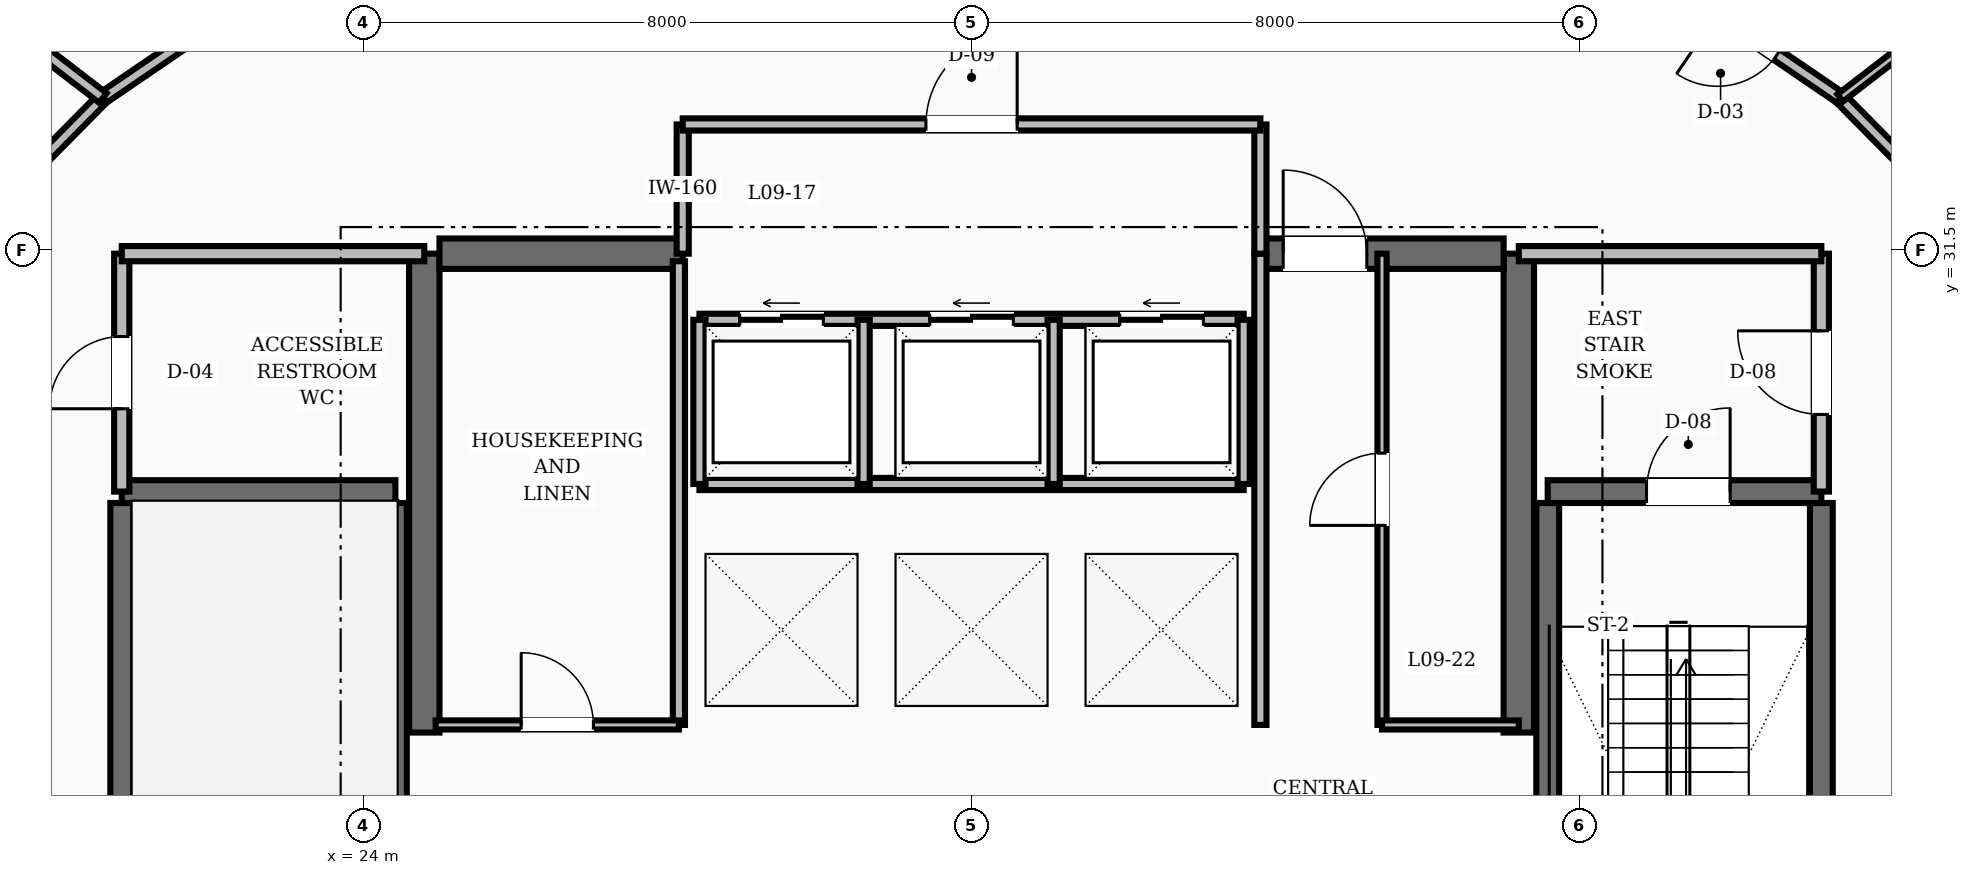
"""IFC4 building model, lengths in metres.
Left out: names, types, materials, properties, quantities, classifications, styles, units other than length and angle.
Written with IfcOpenShell. Run it as: python <this file> out.ifc"""

import sys

from ifc_helpers import new_model, si_unit, direction, frame, frame_2d, origin, place, context, subcontext, project, spatial, rectangle, extrude, element, fill, save


model = new_model("IFC4")
c1 = context("Model", 3, precision=1e-05, world=origin(), true_north=direction((0.0, 1.0)))
c2 = subcontext(c1, "Body", "Model", "MODEL_VIEW")
j1 = project(units=[si_unit("LENGTHUNIT", "METRE"), si_unit("PLANEANGLEUNIT", "RADIAN")], contexts=[c1])
p1 = place(None, origin())
s1 = spatial("IfcSite", under=j1, at=p1, CompositionType="ELEMENT")
p2 = place(p1, origin())
s2 = spatial("IfcBuilding", under=s1, at=p2, CompositionType="ELEMENT")
p3 = place(p2, frame((0.0, 0.0, 41.2)))
s3 = spatial("IfcBuildingStorey", under=s2, at=p3, CompositionType="ELEMENT", Elevation=41.2)
for number, where, z_axis, x_axis in (
    (1, (24.8, 25.15, 0.0), (0.0, 0.0, 1.0), (0.0, 1.0, 0.0)),
    (2, (39.2, 25.15, 0.0), (0.0, 0.0, 1.0), (0.0, 1.0, 0.0)),
):
    element("IfcWall", number, at=place(p3, frame(where, z_axis=z_axis, x_axis=x_axis)), inside=s3, PredefinedType="SHEAR", context=c2, shape_type="SweptSolid", body=[
        extrude(rectangle(XDim=6.3, YDim=0.4, at=frame_2d((3.15, 0.0))), origin(), (0.0, 0.0, 1.0), 3.6),
    ])
p4 = place(p3, frame((25.0, 31.45, 0.0), z_axis=(0.0, 0.0, 1.0), x_axis=(1.0, 0.0, 0.0)))
e3 = element("IfcWall", 3, at=p4, inside=s3, PredefinedType="SHEAR", context=c2, shape_type="SweptSolid", body=[
    extrude(rectangle(XDim=3.2, YDim=0.4, at=frame_2d((1.6, 0.0))), origin(), (0.0, 0.0, 1.0), 3.6),
])
p5 = place(p3, frame((35.8, 31.45, 0.0), z_axis=(0.0, 0.0, 1.0), x_axis=(1.0, 0.0, 0.0)))
e4 = element("IfcWall", 4, at=p5, inside=s3, PredefinedType="SHEAR", context=c2, shape_type="SweptSolid", body=[
    extrude(rectangle(XDim=3.2, YDim=0.4, at=frame_2d((1.6, 0.0))), origin(), (0.0, 0.0, 1.0), 3.6),
])
p6 = place(p5, frame((0.3, 0.0, 0.0)))
e5 = element("IfcOpeningElement", 5, at=p6, cuts=e4, PredefinedType="OPENING", context=c2, shape_type="SweptSolid", body=[
    extrude(rectangle(XDim=1.1, YDim=2.1, at=frame_2d((0.55, 1.05))), frame((0.0, 0.21, 0.0), z_axis=(0.0, -1.0, 0.0), x_axis=(1.0, 0.0, 0.0)), (0.0, 0.0, 1.0), 0.42),
])
for number, where, z_axis, x_axis in (
    (6, (20.82, 19.43, 0.0), (0.0, 0.0, 1.0), (0.0, 1.0, 0.0)),
    (7, (24.42, 19.43, 0.0), (0.0, 0.0, 1.0), (0.0, 1.0, 0.0)),
):
    element("IfcWall", number, at=place(p3, frame(where, z_axis=z_axis, x_axis=x_axis)), inside=s3, PredefinedType="SHEAR", context=c2, shape_type="SweptSolid", body=[
        extrude(rectangle(XDim=8.74, YDim=0.3, at=frame_2d((4.37, 0.0))), origin(), (0.0, 0.0, 1.0), 3.6),
    ])
p7 = place(p3, frame((20.82, 28.32, 0.0), z_axis=(0.0, 0.0, 1.0), x_axis=(1.0, 0.0, 0.0)))
e8 = element("IfcWall", 8, at=p7, inside=s3, PredefinedType="SHEAR", context=c2, shape_type="SweptSolid", body=[
    extrude(rectangle(XDim=3.6, YDim=0.3, at=frame_2d((1.8, 0.0))), origin(), (0.0, 0.0, 1.0), 3.6),
])
for number, where, z_axis, x_axis in (
    (9, (43.18, 19.43, 0.0), (0.0, 0.0, 1.0), (0.0, 1.0, 0.0)),
    (10, (39.58, 19.43, 0.0), (0.0, 0.0, 1.0), (0.0, 1.0, 0.0)),
):
    element("IfcWall", number, at=place(p3, frame(where, z_axis=z_axis, x_axis=x_axis)), inside=s3, PredefinedType="SHEAR", context=c2, shape_type="SweptSolid", body=[
        extrude(rectangle(XDim=8.74, YDim=0.3, at=frame_2d((4.37, 0.0))), origin(), (0.0, 0.0, 1.0), 3.6),
    ])
p8 = place(p3, frame((39.58, 28.32, 0.0), z_axis=(0.0, 0.0, 1.0), x_axis=(1.0, 0.0, 0.0)))
e11 = element("IfcWall", 11, at=p8, inside=s3, PredefinedType="SHEAR", context=c2, shape_type="SweptSolid", body=[
    extrude(rectangle(XDim=3.6, YDim=0.3, at=frame_2d((1.8, 0.0))), origin(), (0.0, 0.0, 1.0), 3.6),
])
p9 = place(p8, frame((1.3, 0.0, 0.0)))
e12 = element("IfcOpeningElement", 12, at=p9, cuts=e11, PredefinedType="OPENING", context=c2, shape_type="SweptSolid", body=[
    extrude(rectangle(XDim=1.1, YDim=2.1, at=frame_2d((0.55, 1.05))), frame((0.0, 0.16, 0.0), z_axis=(0.0, -1.0, 0.0), x_axis=(1.0, 0.0, 0.0)), (0.0, 0.0, 1.0), 0.32),
])
p10 = place(p3, frame((43.18, 28.32, 0.0), z_axis=(0.0, 0.0, 1.0), x_axis=(0.0, 1.0, 0.0)))
e13 = element("IfcWall", 13, at=p10, inside=s3, PredefinedType="SOLIDWALL", context=c2, shape_type="SweptSolid", body=[
    extrude(rectangle(XDim=3.13, YDim=0.2, at=frame_2d((1.565, 0.0))), origin(), (0.0, 0.0, 1.0), 2.61),
])
p11 = place(p10, frame((1.015, 0.0, 0.0)))
e14 = element("IfcOpeningElement", 14, at=p11, cuts=e13, PredefinedType="OPENING", context=c2, shape_type="SweptSolid", body=[
    extrude(rectangle(XDim=1.1, YDim=2.1, at=frame_2d((0.55, 1.05))), frame((0.0, 0.11, 0.0), z_axis=(0.0, -1.0, 0.0), x_axis=(1.0, 0.0, 0.0)), (0.0, 0.0, 1.0), 0.22),
])
p12 = place(p3, frame((39.2, 31.45, 0.0), z_axis=(0.0, 0.0, 1.0), x_axis=(1.0, 0.0, 0.0)))
e15 = element("IfcWall", 15, at=p12, inside=s3, PredefinedType="SOLIDWALL", context=c2, shape_type="SweptSolid", body=[
    extrude(rectangle(XDim=3.98, YDim=0.2, at=frame_2d((1.99, 0.0))), origin(), (0.0, 0.0, 1.0), 2.61),
])
p13 = place(p3, frame((20.82, 28.32, 0.0), z_axis=(0.0, 0.0, 1.0), x_axis=(0.0, 1.0, 0.0)))
e16 = element("IfcWall", 16, at=p13, inside=s3, PredefinedType="SOLIDWALL", context=c2, shape_type="SweptSolid", body=[
    extrude(rectangle(XDim=3.13, YDim=0.2, at=frame_2d((1.565, 0.0))), origin(), (0.0, 0.0, 1.0), 2.61),
])
p14 = place(p13, frame((1.09, 0.0, 0.0)))
e17 = element("IfcOpeningElement", 17, at=p14, cuts=e16, PredefinedType="OPENING", context=c2, shape_type="SweptSolid", body=[
    extrude(rectangle(XDim=0.95, YDim=2.1, at=frame_2d((0.475, 1.05))), frame((0.0, 0.11, 0.0), z_axis=(0.0, -1.0, 0.0), x_axis=(1.0, 0.0, 0.0)), (0.0, 0.0, 1.0), 0.22),
])
p15 = place(p3, frame((20.82, 31.45, 0.0), z_axis=(0.0, 0.0, 1.0), x_axis=(1.0, 0.0, 0.0)))
e18 = element("IfcWall", 18, at=p15, inside=s3, PredefinedType="SOLIDWALL", context=c2, shape_type="SweptSolid", body=[
    extrude(rectangle(XDim=3.98, YDim=0.2, at=frame_2d((1.99, 0.0))), origin(), (0.0, 0.0, 1.0), 2.61),
])
p16 = place(p3, frame((35.8, 25.25, 0.0), z_axis=(0.0, 0.0, 1.0), x_axis=(0.0, 1.0, 0.0)))
e19 = element("IfcWall", 19, at=p16, inside=s3, PredefinedType="SOLIDWALL", context=c2, shape_type="SweptSolid", body=[
    extrude(rectangle(XDim=6.2, YDim=0.16, at=frame_2d((3.1, 0.0))), origin(), (0.0, 0.0, 1.0), 2.61),
])
p17 = place(p3, frame((28.42, 30.58, 0.0), z_axis=(0.0, 0.0, 1.0), x_axis=(1.0, 0.0, 0.0)))
e20 = element("IfcWall", 20, at=p17, inside=s3, PredefinedType="SOLIDWALL", context=c2, shape_type="SweptSolid", body=[
    extrude(rectangle(XDim=7.16, YDim=0.16, at=frame_2d((3.58, 0.0))), origin(), (0.0, 0.0, 1.0), 2.61),
])
p18 = place(p17, frame((0.53, 0.0, 0.0)))
e21 = element("IfcOpeningElement", 21, at=p18, cuts=e20, PredefinedType="OPENING", context=c2, shape_type="SweptSolid", body=[
    extrude(rectangle(XDim=1.1, YDim=2.15, at=frame_2d((0.55, 1.075))), frame((0.0, 0.09, 0.0), z_axis=(0.0, -1.0, 0.0), x_axis=(1.0, 0.0, 0.0)), (0.0, 0.0, 1.0), 0.18),
])
p19 = place(p17, frame((3.03, 0.0, 0.0)))
e22 = element("IfcOpeningElement", 22, at=p19, cuts=e20, PredefinedType="OPENING", context=c2, shape_type="SweptSolid", body=[
    extrude(rectangle(XDim=1.1, YDim=2.15, at=frame_2d((0.55, 1.075))), frame((0.0, 0.09, 0.0), z_axis=(0.0, -1.0, 0.0), x_axis=(1.0, 0.0, 0.0)), (0.0, 0.0, 1.0), 0.18),
])
p20 = place(p17, frame((5.53, 0.0, 0.0)))
e23 = element("IfcOpeningElement", 23, at=p20, cuts=e20, PredefinedType="OPENING", context=c2, shape_type="SweptSolid", body=[
    extrude(rectangle(XDim=1.1, YDim=2.15, at=frame_2d((0.55, 1.075))), frame((0.0, 0.09, 0.0), z_axis=(0.0, -1.0, 0.0), x_axis=(1.0, 0.0, 0.0)), (0.0, 0.0, 1.0), 0.18),
])
p21 = place(p3, frame((28.42, 28.42, 0.0), z_axis=(0.0, 0.0, 1.0), x_axis=(1.0, 0.0, 0.0)))
e24 = element("IfcWall", 24, at=p21, inside=s3, PredefinedType="SOLIDWALL", context=c2, shape_type="SweptSolid", body=[
    extrude(rectangle(XDim=7.16, YDim=0.16, at=frame_2d((3.58, 0.0))), origin(), (0.0, 0.0, 1.0), 2.61),
])
for number, where, z_axis, x_axis in (
    (25, (28.42, 28.42, 0.0), (0.0, 0.0, 1.0), (0.0, 1.0, 0.0)),
    (26, (30.58, 28.42, 0.0), (0.0, 0.0, 1.0), (0.0, 1.0, 0.0)),
    (27, (33.08, 28.42, 0.0), (0.0, 0.0, 1.0), (0.0, 1.0, 0.0)),
    (28, (35.58, 28.42, 0.0), (0.0, 0.0, 1.0), (0.0, 1.0, 0.0)),
):
    element("IfcWall", number, at=place(p3, frame(where, z_axis=z_axis, x_axis=x_axis)), inside=s3, PredefinedType="SOLIDWALL", context=c2, shape_type="SweptSolid", body=[
        extrude(rectangle(XDim=2.16, YDim=0.16, at=frame_2d((1.08, 0.0))), origin(), (0.0, 0.0, 1.0), 2.61),
    ])
for number, where, z_axis, x_axis in (
    (29, (28.2, 31.45, 0.0), (0.0, 0.0, 1.0), (0.0, 1.0, 0.0)),
    (30, (35.8, 31.45, 0.0), (0.0, 0.0, 1.0), (0.0, 1.0, 0.0)),
):
    element("IfcWall", number, at=place(p3, frame(where, z_axis=z_axis, x_axis=x_axis)), inside=s3, PredefinedType="SOLIDWALL", context=c2, shape_type="SweptSolid", body=[
        extrude(rectangle(XDim=1.7, YDim=0.16, at=frame_2d((0.85, 0.0))), origin(), (0.0, 0.0, 1.0), 2.61),
    ])
p22 = place(p3, frame((28.2, 33.15, 0.0), z_axis=(0.0, 0.0, 1.0), x_axis=(1.0, 0.0, 0.0)))
e31 = element("IfcWall", 31, at=p22, inside=s3, PredefinedType="SOLIDWALL", context=c2, shape_type="SweptSolid", body=[
    extrude(rectangle(XDim=7.6, YDim=0.16, at=frame_2d((3.8, 0.0))), origin(), (0.0, 0.0, 1.0), 2.61),
])
p23 = place(p22, frame((3.2, 0.0, 0.0)))
e32 = element("IfcOpeningElement", 32, at=p23, cuts=e31, PredefinedType="OPENING", context=c2, shape_type="SweptSolid", body=[
    extrude(rectangle(XDim=1.2, YDim=2.1, at=frame_2d((0.6, 1.05))), frame((0.0, 0.09, 0.0), z_axis=(0.0, -1.0, 0.0), x_axis=(1.0, 0.0, 0.0)), (0.0, 0.0, 1.0), 0.18),
])
p24 = place(p3, frame((28.15, 25.25, 0.0), z_axis=(0.0, 0.0, 1.0), x_axis=(0.0, 1.0, 0.0)))
e33 = element("IfcWall", 33, at=p24, inside=s3, PredefinedType="SOLIDWALL", context=c2, shape_type="SweptSolid", body=[
    extrude(rectangle(XDim=6.1, YDim=0.16, at=frame_2d((3.05, 0.0))), origin(), (0.0, 0.0, 1.0), 2.61),
])
p25 = place(p3, frame((24.95, 25.25, 0.0), z_axis=(0.0, 0.0, 1.0), x_axis=(1.0, 0.0, 0.0)))
e34 = element("IfcWall", 34, at=p25, inside=s3, PredefinedType="PARTITIONING", context=c2, shape_type="SweptSolid", body=[
    extrude(rectangle(XDim=3.2, YDim=0.12, at=frame_2d((1.6, 0.0))), origin(), (0.0, 0.0, 1.0), 2.61),
])
p26 = place(p25, frame((1.125, 0.0, 0.0)))
e35 = element("IfcOpeningElement", 35, at=p26, cuts=e34, PredefinedType="OPENING", context=c2, shape_type="SweptSolid", body=[
    extrude(rectangle(XDim=0.95, YDim=2.1, at=frame_2d((0.475, 1.05))), frame((0.0, 0.07, 0.0), z_axis=(0.0, -1.0, 0.0), x_axis=(1.0, 0.0, 0.0)), (0.0, 0.0, 1.0), 0.14),
])
p27 = place(p3, frame((37.4, 25.25, 0.0), z_axis=(0.0, 0.0, 1.0), x_axis=(0.0, 1.0, 0.0)))
e36 = element("IfcWall", 36, at=p27, inside=s3, PredefinedType="PARTITIONING", context=c2, shape_type="SweptSolid", body=[
    extrude(rectangle(XDim=6.2, YDim=0.12, at=frame_2d((3.1, 0.0))), origin(), (0.0, 0.0, 1.0), 2.61),
])
p28 = place(p27, frame((2.625, 0.0, 0.0)))
e37 = element("IfcOpeningElement", 37, at=p28, cuts=e36, PredefinedType="OPENING", context=c2, shape_type="SweptSolid", body=[
    extrude(rectangle(XDim=0.95, YDim=2.1, at=frame_2d((0.475, 1.05))), frame((0.0, 0.07, 0.0), z_axis=(0.0, -1.0, 0.0), x_axis=(1.0, 0.0, 0.0)), (0.0, 0.0, 1.0), 0.14),
])
p29 = place(p3, frame((37.4, 25.25, 0.0), z_axis=(0.0, 0.0, 1.0), x_axis=(1.0, 0.0, 0.0)))
e38 = element("IfcWall", 38, at=p29, inside=s3, PredefinedType="PARTITIONING", context=c2, shape_type="SweptSolid", body=[
    extrude(rectangle(XDim=1.8, YDim=0.12, at=frame_2d((0.9, 0.0))), origin(), (0.0, 0.0, 1.0), 2.61),
])
p30 = place(p3, frame((45.438, 31.463, 0.0), z_axis=(0.0, 0.0, 1.0), x_axis=(-0.702569520063, 0.711615113301, 0.0)))
e39 = element("IfcWall", 39, at=p30, inside=s3, PredefinedType="SOLIDWALL", context=c2, shape_type="SweptSolid", body=[
    extrude(rectangle(XDim=2.861, YDim=0.16, at=frame_2d((1.43, 0.0))), origin(), (0.0, 0.0, 1.0), 2.61),
])
p31 = place(p3, frame((43.428, 33.499, 0.0), z_axis=(0.0, 0.0, 1.0), x_axis=(-0.826112340767, 0.563505457323, 0.0)))
e40 = element("IfcWall", 40, at=p31, inside=s3, PredefinedType="SOLIDWALL", context=c2, shape_type="SweptSolid", body=[
    extrude(rectangle(XDim=2.965, YDim=0.16, at=frame_2d((1.482, 0.0))), origin(), (0.0, 0.0, 1.0), 2.61),
])
p32 = place(p31, frame((1.007, 0.0, 0.0)))
e41 = element("IfcOpeningElement", 41, at=p32, cuts=e40, PredefinedType="OPENING", context=c2, shape_type="SweptSolid", body=[
    extrude(rectangle(XDim=0.95, YDim=2.1, at=frame_2d((0.475, 1.05))), frame((0.0, 0.09, 0.0), z_axis=(0.0, -1.0, 0.0), x_axis=(1.0, 0.0, 0.0)), (0.0, 0.0, 1.0), 0.18),
])
p33 = place(p3, frame((23.021, 35.17, 0.0), z_axis=(0.0, 0.0, 1.0), x_axis=(-0.826112340767, -0.563505457323, 0.0)))
e42 = element("IfcWall", 42, at=p33, inside=s3, PredefinedType="SOLIDWALL", context=c2, shape_type="SweptSolid", body=[
    extrude(rectangle(XDim=2.965, YDim=0.16, at=frame_2d((1.482, 0.0))), origin(), (0.0, 0.0, 1.0), 2.61),
])
p34 = place(p3, frame((20.572, 33.499, 0.0), z_axis=(0.0, 0.0, 1.0), x_axis=(-0.702569520063, -0.711615113301, 0.0)))
e43 = element("IfcWall", 43, at=p34, inside=s3, PredefinedType="SOLIDWALL", context=c2, shape_type="SweptSolid", body=[
    extrude(rectangle(XDim=2.861, YDim=0.16, at=frame_2d((1.43, 0.0))), origin(), (0.0, 0.0, 1.0), 2.61),
])
p35 = place(p3, frame((43.428, 33.499, 0.0), z_axis=(0.0, 0.0, 1.0), x_axis=(0.792385390658, 0.61002081331, 0.0)))
e44 = element("IfcWall", 44, at=p35, inside=s3, PredefinedType="PARTITIONING", context=c2, shape_type="SweptSolid", body=[
    extrude(rectangle(XDim=3.348, YDim=0.12, at=frame_2d((1.674, 0.0))), origin(), (0.0, 0.0, 1.0), 2.61),
])
p36 = place(p3, frame((20.572, 33.499, 0.0), z_axis=(0.0, 0.0, 1.0), x_axis=(-0.792372185587, 0.610037965629, 0.0)))
e45 = element("IfcWall", 45, at=p36, inside=s3, PredefinedType="SOLIDWALL", context=c2, shape_type="SweptSolid", body=[
    extrude(rectangle(XDim=8.761, YDim=0.16, at=frame_2d((4.38, 0.0))), origin(), (0.0, 0.0, 1.0), 2.61),
])
p37 = place(p9, origin())
e46 = element("IfcDoor", 46, at=p37, inside=s3, OperationType="SINGLE_SWING_RIGHT", PredefinedType="DOOR", context=c2, shape_type="SweptSolid", body=[
    extrude(rectangle(XDim=1.1, YDim=2.1, at=frame_2d((0.55, 1.05))), frame((0.0, 0.025, 0.0), z_axis=(0.0, -1.0, 0.0), x_axis=(1.0, 0.0, 0.0)), (0.0, 0.0, 1.0), 0.05),
])
fill(e12, e46)
p38 = place(p11, origin())
e47 = element("IfcDoor", 47, at=p38, inside=s3, OperationType="SINGLE_SWING_RIGHT", PredefinedType="DOOR", context=c2, shape_type="SweptSolid", body=[
    extrude(rectangle(XDim=1.1, YDim=2.1, at=frame_2d((0.55, 1.05))), frame((0.0, 0.025, 0.0), z_axis=(0.0, -1.0, 0.0), x_axis=(1.0, 0.0, 0.0)), (0.0, 0.0, 1.0), 0.05),
])
fill(e14, e47)
p39 = place(p14, origin())
e48 = element("IfcDoor", 48, at=p39, inside=s3, OperationType="SINGLE_SWING_LEFT", PredefinedType="DOOR", context=c2, shape_type="SweptSolid", body=[
    extrude(rectangle(XDim=0.95, YDim=2.1, at=frame_2d((0.475, 1.05))), frame((0.0, 0.025, 0.0), z_axis=(0.0, -1.0, 0.0), x_axis=(1.0, 0.0, 0.0)), (0.0, 0.0, 1.0), 0.05),
])
fill(e17, e48)
p40 = place(p6, origin())
e49 = element("IfcDoor", 49, at=p40, inside=s3, OperationType="SINGLE_SWING_LEFT", PredefinedType="DOOR", context=c2, shape_type="SweptSolid", body=[
    extrude(rectangle(XDim=1.1, YDim=2.1, at=frame_2d((0.55, 1.05))), frame((0.0, 0.025, 0.0), z_axis=(0.0, -1.0, 0.0), x_axis=(1.0, 0.0, 0.0)), (0.0, 0.0, 1.0), 0.05),
])
fill(e5, e49)
p41 = place(p18, origin())
e50 = element("IfcDoor", 50, at=p41, inside=s3, OperationType="SLIDING_TO_LEFT", PredefinedType="DOOR", context=c2, shape_type="SweptSolid", body=[
    extrude(rectangle(XDim=1.1, YDim=2.15, at=frame_2d((0.55, 1.075))), frame((0.0, 0.025, 0.0), z_axis=(0.0, -1.0, 0.0), x_axis=(1.0, 0.0, 0.0)), (0.0, 0.0, 1.0), 0.05),
])
fill(e21, e50)
p42 = place(p19, origin())
e51 = element("IfcDoor", 51, at=p42, inside=s3, OperationType="SLIDING_TO_LEFT", PredefinedType="DOOR", context=c2, shape_type="SweptSolid", body=[
    extrude(rectangle(XDim=1.1, YDim=2.15, at=frame_2d((0.55, 1.075))), frame((0.0, 0.025, 0.0), z_axis=(0.0, -1.0, 0.0), x_axis=(1.0, 0.0, 0.0)), (0.0, 0.0, 1.0), 0.05),
])
fill(e22, e51)
p43 = place(p20, origin())
e52 = element("IfcDoor", 52, at=p43, inside=s3, OperationType="SLIDING_TO_LEFT", PredefinedType="DOOR", context=c2, shape_type="SweptSolid", body=[
    extrude(rectangle(XDim=1.1, YDim=2.15, at=frame_2d((0.55, 1.075))), frame((0.0, 0.025, 0.0), z_axis=(0.0, -1.0, 0.0), x_axis=(1.0, 0.0, 0.0)), (0.0, 0.0, 1.0), 0.05),
])
fill(e23, e52)
p44 = place(p23, origin())
e53 = element("IfcDoor", 53, at=p44, inside=s3, OperationType="SINGLE_SWING_RIGHT", PredefinedType="DOOR", context=c2, shape_type="SweptSolid", body=[
    extrude(rectangle(XDim=1.2, YDim=2.1, at=frame_2d((0.6, 1.05))), frame((0.0, 0.025, 0.0), z_axis=(0.0, -1.0, 0.0), x_axis=(1.0, 0.0, 0.0)), (0.0, 0.0, 1.0), 0.05),
])
fill(e32, e53)
p45 = place(p26, origin())
e54 = element("IfcDoor", 54, at=p45, inside=s3, OperationType="SINGLE_SWING_LEFT", PredefinedType="DOOR", context=c2, shape_type="SweptSolid", body=[
    extrude(rectangle(XDim=0.95, YDim=2.1, at=frame_2d((0.475, 1.05))), frame((0.0, 0.025, 0.0), z_axis=(0.0, -1.0, 0.0), x_axis=(1.0, 0.0, 0.0)), (0.0, 0.0, 1.0), 0.05),
])
fill(e35, e54)
p46 = place(p28, origin())
e55 = element("IfcDoor", 55, at=p46, inside=s3, OperationType="SINGLE_SWING_LEFT", PredefinedType="DOOR", context=c2, shape_type="SweptSolid", body=[
    extrude(rectangle(XDim=0.95, YDim=2.1, at=frame_2d((0.475, 1.05))), frame((0.0, 0.025, 0.0), z_axis=(0.0, -1.0, 0.0), x_axis=(1.0, 0.0, 0.0)), (0.0, 0.0, 1.0), 0.05),
])
fill(e37, e55)
p47 = place(p32, origin())
e56 = element("IfcDoor", 56, at=p47, inside=s3, OperationType="SINGLE_SWING_RIGHT", PredefinedType="DOOR", context=c2, shape_type="SweptSolid", body=[
    extrude(rectangle(XDim=0.95, YDim=2.1, at=frame_2d((0.475, 1.05))), frame((0.0, 0.025, 0.0), z_axis=(0.0, -1.0, 0.0), x_axis=(1.0, 0.0, 0.0)), (0.0, 0.0, 1.0), 0.05),
])
fill(e41, e56)
save(model, sys.argv[1])
